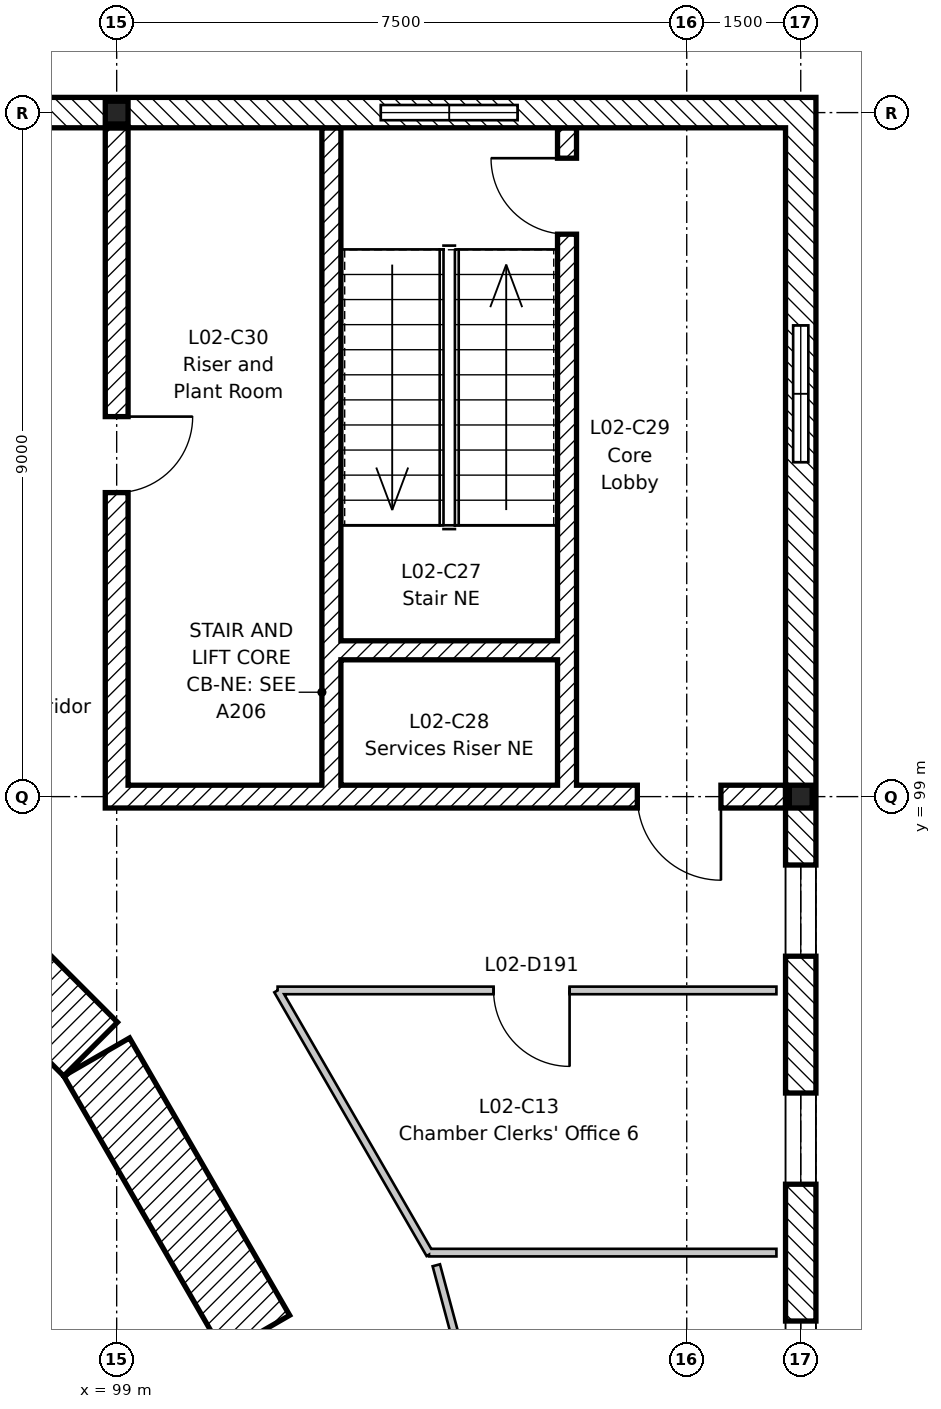
"""IFC4 building model, lengths in metres.
Left out: names, types, materials, properties, quantities, classifications, styles, units other than length and angle.
Written with IfcOpenShell. Run it as: python <this file> out.ifc"""

import sys

from ifc_helpers import new_model, si_unit, direction, frame, frame_2d, origin, origin_2d, place, context, subcontext, project, spatial, rectangle, i_section, extrude, element, fill, save


model = new_model("IFC4")
c1 = context("Model", 3, precision=1e-05, world=origin(), true_north=direction((0.0, 1.0)))
c2 = subcontext(c1, "Body", "Model", "MODEL_VIEW")
j1 = project(units=[si_unit("LENGTHUNIT", "METRE"), si_unit("PLANEANGLEUNIT", "RADIAN")], contexts=[c1])
p1 = place(None, origin())
s1 = spatial("IfcSite", under=j1, at=p1, CompositionType="ELEMENT")
p2 = place(p1, origin())
s2 = spatial("IfcBuilding", under=s1, at=p2, CompositionType="ELEMENT")
p3 = place(p2, frame((0.0, 0.0, 9.9)))
s3 = spatial("IfcBuildingStorey", under=s2, at=p3, CompositionType="ELEMENT", Elevation=9.9)
for number, where, z_axis, x_axis in (
    (1, (99.0, 108.0, -0.2), (0.0, 0.0, 1.0), (1.0, 0.0, 0.0)),
    (2, (108.0, 99.0, -0.2), (0.0, 0.0, 1.0), (1.0, 0.0, 0.0)),
):
    element("IfcColumn", number, at=place(p3, frame(where, z_axis=z_axis, x_axis=x_axis)), inside=s3, PredefinedType="COLUMN", context=c2, shape_type="SweptSolid", body=[
        extrude(i_section(OverallWidth=0.3, OverallDepth=0.3, WebThickness=0.011, FlangeThickness=0.019, FilletRadius=0.027, at=origin_2d()), origin(), (0.0, 0.0, 1.0), 4.45),
    ])
for number, where, z_axis, x_axis in (
    (3, (100.843, 91.926, 0.0), (0.0, 0.0, 1.0), (-0.5, 0.866, 0.0)),
    (4, (98.657, 95.678, 0.0), (0.0, 0.0, 1.0), (-0.707, 0.707, 0.0)),
):
    element("IfcWall", number, at=place(p3, frame(where, z_axis=z_axis, x_axis=x_axis)), inside=s3, PredefinedType="SHEAR", context=c2, shape_type="SweptSolid", body=[
        extrude(rectangle(XDim=4.213, YDim=1.0, at=frame_2d((2.106, 0.0))), origin(), (0.0, 0.0, 1.0), 4.3),
    ])
p4 = place(p3, frame((107.8, 99.0, 0.0), z_axis=(0.0, 0.0, 1.0), x_axis=(-1.0, 0.0, 0.0)))
e5 = element("IfcWall", 5, at=p4, inside=s3, PredefinedType="SHEAR", context=c2, shape_type="SweptSolid", body=[
    extrude(rectangle(XDim=8.95, YDim=0.3, at=frame_2d((4.475, 0.0))), origin(), (0.0, 0.0, 1.0), 4.3),
])
p5 = place(p4, frame((0.85, 0.0, 0.0)))
e6 = element("IfcOpeningElement", 6, at=p5, cuts=e5, PredefinedType="OPENING", context=c2, shape_type="SweptSolid", body=[
    extrude(rectangle(XDim=1.1, YDim=2.1, at=frame_2d((0.55, 1.05))), frame((0.0, 0.16, 0.0), z_axis=(0.0, -1.0, 0.0), x_axis=(1.0, 0.0, 0.0)), (0.0, 0.0, 1.0), 0.32),
])
p6 = place(p3, frame((99.0, 107.8, 0.0), z_axis=(0.0, 0.0, 1.0), x_axis=(0.0, -1.0, 0.0)))
e7 = element("IfcWall", 7, at=p6, inside=s3, PredefinedType="SHEAR", context=c2, shape_type="SweptSolid", body=[
    extrude(rectangle(XDim=8.65, YDim=0.3, at=frame_2d((4.325, 0.0))), origin(), (0.0, 0.0, 1.0), 4.3),
])
p7 = place(p6, frame((3.8, 0.0, 0.0)))
e8 = element("IfcOpeningElement", 8, at=p7, cuts=e7, PredefinedType="OPENING", context=c2, shape_type="SweptSolid", body=[
    extrude(rectangle(XDim=1.0, YDim=2.1, at=frame_2d((0.5, 1.05))), frame((0.0, 0.16, 0.0), z_axis=(0.0, -1.0, 0.0), x_axis=(1.0, 0.0, 0.0)), (0.0, 0.0, 1.0), 0.32),
])
p8 = place(p3, frame((104.925, 107.8, 0.0), z_axis=(0.0, 0.0, 1.0), x_axis=(0.0, -1.0, 0.0)))
e9 = element("IfcWall", 9, at=p8, inside=s3, PredefinedType="SHEAR", context=c2, shape_type="SweptSolid", body=[
    extrude(rectangle(XDim=8.65, YDim=0.25, at=frame_2d((4.325, 0.0))), origin(), (0.0, 0.0, 1.0), 4.3),
])
p9 = place(p8, frame((0.4, 0.0, 0.0)))
e10 = element("IfcOpeningElement", 10, at=p9, cuts=e9, PredefinedType="OPENING", context=c2, shape_type="SweptSolid", body=[
    extrude(rectangle(XDim=1.0, YDim=2.1, at=frame_2d((0.5, 1.05))), frame((0.0, 0.135, 0.0), z_axis=(0.0, -1.0, 0.0), x_axis=(1.0, 0.0, 0.0)), (0.0, 0.0, 1.0), 0.27),
])
p10 = place(p3, frame((101.825, 107.8, 0.0), z_axis=(0.0, 0.0, 1.0), x_axis=(0.0, -1.0, 0.0)))
e11 = element("IfcWall", 11, at=p10, inside=s3, PredefinedType="SHEAR", context=c2, shape_type="SweptSolid", body=[
    extrude(rectangle(XDim=8.65, YDim=0.25, at=frame_2d((4.325, 0.0))), origin(), (0.0, 0.0, 1.0), 4.3),
])
p11 = place(p3, frame((104.8, 100.925, 0.0), z_axis=(0.0, 0.0, 1.0), x_axis=(-1.0, 0.0, 0.0)))
e12 = element("IfcWall", 12, at=p11, inside=s3, PredefinedType="SHEAR", context=c2, shape_type="SweptSolid", body=[
    extrude(rectangle(XDim=2.85, YDim=0.25, at=frame_2d((1.425, 0.0))), origin(), (0.0, 0.0, 1.0), 4.3),
])
p12 = place(p3, frame((72.0, 108.0, 0.0), z_axis=(0.0, 0.0, 1.0), x_axis=(1.0, 0.0, 0.0)))
e13 = element("IfcWall", 13, at=p12, inside=s3, PredefinedType="STANDARD", context=c2, shape_type="SweptSolid", body=[
    extrude(rectangle(XDim=27.0, YDim=0.4, at=frame_2d((13.5, 0.0))), origin(), (0.0, 0.0, 1.0), 3.76),
])
p13 = place(p12, frame((0.9, 0.0, 0.9)))
e14 = element("IfcOpeningElement", 14, at=p13, cuts=e13, PredefinedType="OPENING", context=c2, shape_type="SweptSolid", body=[
    extrude(rectangle(XDim=1.2, YDim=2.4, at=frame_2d((0.6, 1.2))), frame((0.0, 0.21, 0.0), z_axis=(0.0, -1.0, 0.0), x_axis=(1.0, 0.0, 0.0)), (0.0, 0.0, 1.0), 0.42),
])
p14 = place(p12, frame((3.9, 0.0, 0.9)))
e15 = element("IfcOpeningElement", 15, at=p14, cuts=e13, PredefinedType="OPENING", context=c2, shape_type="SweptSolid", body=[
    extrude(rectangle(XDim=1.2, YDim=2.4, at=frame_2d((0.6, 1.2))), frame((0.0, 0.21, 0.0), z_axis=(0.0, -1.0, 0.0), x_axis=(1.0, 0.0, 0.0)), (0.0, 0.0, 1.0), 0.42),
])
p15 = place(p12, frame((6.9, 0.0, 0.9)))
e16 = element("IfcOpeningElement", 16, at=p15, cuts=e13, PredefinedType="OPENING", context=c2, shape_type="SweptSolid", body=[
    extrude(rectangle(XDim=1.2, YDim=2.4, at=frame_2d((0.6, 1.2))), frame((0.0, 0.21, 0.0), z_axis=(0.0, -1.0, 0.0), x_axis=(1.0, 0.0, 0.0)), (0.0, 0.0, 1.0), 0.42),
])
p16 = place(p12, frame((9.9, 0.0, 0.9)))
e17 = element("IfcOpeningElement", 17, at=p16, cuts=e13, PredefinedType="OPENING", context=c2, shape_type="SweptSolid", body=[
    extrude(rectangle(XDim=1.2, YDim=2.4, at=frame_2d((0.6, 1.2))), frame((0.0, 0.21, 0.0), z_axis=(0.0, -1.0, 0.0), x_axis=(1.0, 0.0, 0.0)), (0.0, 0.0, 1.0), 0.42),
])
p17 = place(p12, frame((12.9, 0.0, 0.9)))
e18 = element("IfcOpeningElement", 18, at=p17, cuts=e13, PredefinedType="OPENING", context=c2, shape_type="SweptSolid", body=[
    extrude(rectangle(XDim=1.2, YDim=2.4, at=frame_2d((0.6, 1.2))), frame((0.0, 0.21, 0.0), z_axis=(0.0, -1.0, 0.0), x_axis=(1.0, 0.0, 0.0)), (0.0, 0.0, 1.0), 0.42),
])
p18 = place(p12, frame((15.9, 0.0, 0.9)))
e19 = element("IfcOpeningElement", 19, at=p18, cuts=e13, PredefinedType="OPENING", context=c2, shape_type="SweptSolid", body=[
    extrude(rectangle(XDim=1.2, YDim=2.4, at=frame_2d((0.6, 1.2))), frame((0.0, 0.21, 0.0), z_axis=(0.0, -1.0, 0.0), x_axis=(1.0, 0.0, 0.0)), (0.0, 0.0, 1.0), 0.42),
])
p19 = place(p12, frame((18.9, 0.0, 0.9)))
e20 = element("IfcOpeningElement", 20, at=p19, cuts=e13, PredefinedType="OPENING", context=c2, shape_type="SweptSolid", body=[
    extrude(rectangle(XDim=1.2, YDim=2.4, at=frame_2d((0.6, 1.2))), frame((0.0, 0.21, 0.0), z_axis=(0.0, -1.0, 0.0), x_axis=(1.0, 0.0, 0.0)), (0.0, 0.0, 1.0), 0.42),
])
p20 = place(p12, frame((21.9, 0.0, 0.9)))
e21 = element("IfcOpeningElement", 21, at=p20, cuts=e13, PredefinedType="OPENING", context=c2, shape_type="SweptSolid", body=[
    extrude(rectangle(XDim=1.2, YDim=2.4, at=frame_2d((0.6, 1.2))), frame((0.0, 0.21, 0.0), z_axis=(0.0, -1.0, 0.0), x_axis=(1.0, 0.0, 0.0)), (0.0, 0.0, 1.0), 0.42),
])
p21 = place(p12, frame((24.9, 0.0, 0.9)))
e22 = element("IfcOpeningElement", 22, at=p21, cuts=e13, PredefinedType="OPENING", context=c2, shape_type="SweptSolid", body=[
    extrude(rectangle(XDim=1.2, YDim=2.4, at=frame_2d((0.6, 1.2))), frame((0.0, 0.21, 0.0), z_axis=(0.0, -1.0, 0.0), x_axis=(1.0, 0.0, 0.0)), (0.0, 0.0, 1.0), 0.42),
])
p22 = place(p3, frame((99.0, 108.0, 0.0), z_axis=(0.0, 0.0, 1.0), x_axis=(1.0, 0.0, 0.0)))
e23 = element("IfcWall", 23, at=p22, inside=s3, PredefinedType="STANDARD", context=c2, shape_type="SweptSolid", body=[
    extrude(rectangle(XDim=3.475, YDim=0.4, at=frame_2d((1.738, 0.0))), origin(), (0.0, 0.0, 1.0), 4.3),
])
p23 = place(p3, frame((104.275, 108.0, 0.0), z_axis=(0.0, 0.0, 1.0), x_axis=(1.0, 0.0, 0.0)))
e24 = element("IfcWall", 24, at=p23, inside=s3, PredefinedType="STANDARD", context=c2, shape_type="SweptSolid", body=[
    extrude(rectangle(XDim=3.925, YDim=0.4, at=frame_2d((1.962, 0.0))), origin(), (0.0, 0.0, 1.0), 4.3),
])
p24 = place(p3, frame((102.475, 108.0, 0.0), z_axis=(0.0, 0.0, 1.0), x_axis=(1.0, 0.0, 0.0)))
e25 = element("IfcWall", 25, at=p24, inside=s3, PredefinedType="STANDARD", context=c2, shape_type="SweptSolid", body=[
    extrude(rectangle(XDim=1.8, YDim=0.4, at=frame_2d((0.9, 0.0))), origin(), (0.0, 0.0, 1.0), 0.9),
])
p25 = place(p3, frame((108.0, 72.0, 0.0), z_axis=(0.0, 0.0, 1.0), x_axis=(0.0, 1.0, 0.0)))
e26 = element("IfcWall", 26, at=p25, inside=s3, PredefinedType="STANDARD", context=c2, shape_type="SweptSolid", body=[
    extrude(rectangle(XDim=27.0, YDim=0.4, at=frame_2d((13.5, 0.0))), origin(), (0.0, 0.0, 1.0), 3.76),
])
p26 = place(p25, frame((0.9, 0.0, 0.9)))
e27 = element("IfcOpeningElement", 27, at=p26, cuts=e26, PredefinedType="OPENING", context=c2, shape_type="SweptSolid", body=[
    extrude(rectangle(XDim=1.2, YDim=2.4, at=frame_2d((0.6, 1.2))), frame((0.0, 0.21, 0.0), z_axis=(0.0, -1.0, 0.0), x_axis=(1.0, 0.0, 0.0)), (0.0, 0.0, 1.0), 0.42),
])
p27 = place(p25, frame((3.9, 0.0, 0.9)))
e28 = element("IfcOpeningElement", 28, at=p27, cuts=e26, PredefinedType="OPENING", context=c2, shape_type="SweptSolid", body=[
    extrude(rectangle(XDim=1.2, YDim=2.4, at=frame_2d((0.6, 1.2))), frame((0.0, 0.21, 0.0), z_axis=(0.0, -1.0, 0.0), x_axis=(1.0, 0.0, 0.0)), (0.0, 0.0, 1.0), 0.42),
])
p28 = place(p25, frame((6.9, 0.0, 0.9)))
e29 = element("IfcOpeningElement", 29, at=p28, cuts=e26, PredefinedType="OPENING", context=c2, shape_type="SweptSolid", body=[
    extrude(rectangle(XDim=1.2, YDim=2.4, at=frame_2d((0.6, 1.2))), frame((0.0, 0.21, 0.0), z_axis=(0.0, -1.0, 0.0), x_axis=(1.0, 0.0, 0.0)), (0.0, 0.0, 1.0), 0.42),
])
p29 = place(p25, frame((9.9, 0.0, 0.9)))
e30 = element("IfcOpeningElement", 30, at=p29, cuts=e26, PredefinedType="OPENING", context=c2, shape_type="SweptSolid", body=[
    extrude(rectangle(XDim=1.2, YDim=2.4, at=frame_2d((0.6, 1.2))), frame((0.0, 0.21, 0.0), z_axis=(0.0, -1.0, 0.0), x_axis=(1.0, 0.0, 0.0)), (0.0, 0.0, 1.0), 0.42),
])
p30 = place(p25, frame((12.9, 0.0, 0.9)))
e31 = element("IfcOpeningElement", 31, at=p30, cuts=e26, PredefinedType="OPENING", context=c2, shape_type="SweptSolid", body=[
    extrude(rectangle(XDim=1.2, YDim=2.4, at=frame_2d((0.6, 1.2))), frame((0.0, 0.21, 0.0), z_axis=(0.0, -1.0, 0.0), x_axis=(1.0, 0.0, 0.0)), (0.0, 0.0, 1.0), 0.42),
])
p31 = place(p25, frame((15.9, 0.0, 0.9)))
e32 = element("IfcOpeningElement", 32, at=p31, cuts=e26, PredefinedType="OPENING", context=c2, shape_type="SweptSolid", body=[
    extrude(rectangle(XDim=1.2, YDim=2.4, at=frame_2d((0.6, 1.2))), frame((0.0, 0.21, 0.0), z_axis=(0.0, -1.0, 0.0), x_axis=(1.0, 0.0, 0.0)), (0.0, 0.0, 1.0), 0.42),
])
p32 = place(p25, frame((18.9, 0.0, 0.9)))
e33 = element("IfcOpeningElement", 33, at=p32, cuts=e26, PredefinedType="OPENING", context=c2, shape_type="SweptSolid", body=[
    extrude(rectangle(XDim=1.2, YDim=2.4, at=frame_2d((0.6, 1.2))), frame((0.0, 0.21, 0.0), z_axis=(0.0, -1.0, 0.0), x_axis=(1.0, 0.0, 0.0)), (0.0, 0.0, 1.0), 0.42),
])
p33 = place(p25, frame((21.9, 0.0, 0.9)))
e34 = element("IfcOpeningElement", 34, at=p33, cuts=e26, PredefinedType="OPENING", context=c2, shape_type="SweptSolid", body=[
    extrude(rectangle(XDim=1.2, YDim=2.4, at=frame_2d((0.6, 1.2))), frame((0.0, 0.21, 0.0), z_axis=(0.0, -1.0, 0.0), x_axis=(1.0, 0.0, 0.0)), (0.0, 0.0, 1.0), 0.42),
])
p34 = place(p25, frame((24.9, 0.0, 0.9)))
e35 = element("IfcOpeningElement", 35, at=p34, cuts=e26, PredefinedType="OPENING", context=c2, shape_type="SweptSolid", body=[
    extrude(rectangle(XDim=1.2, YDim=2.4, at=frame_2d((0.6, 1.2))), frame((0.0, 0.21, 0.0), z_axis=(0.0, -1.0, 0.0), x_axis=(1.0, 0.0, 0.0)), (0.0, 0.0, 1.0), 0.42),
])
p35 = place(p3, frame((108.0, 99.0, 0.0), z_axis=(0.0, 0.0, 1.0), x_axis=(0.0, 1.0, 0.0)))
e36 = element("IfcWall", 36, at=p35, inside=s3, PredefinedType="STANDARD", context=c2, shape_type="SweptSolid", body=[
    extrude(rectangle(XDim=4.4, YDim=0.4, at=frame_2d((2.2, 0.0))), origin(), (0.0, 0.0, 1.0), 4.3),
])
p36 = place(p3, frame((108.0, 105.2, 0.0), z_axis=(0.0, 0.0, 1.0), x_axis=(0.0, 1.0, 0.0)))
e37 = element("IfcWall", 37, at=p36, inside=s3, PredefinedType="STANDARD", context=c2, shape_type="SweptSolid", body=[
    extrude(rectangle(XDim=2.6, YDim=0.4, at=frame_2d((1.3, 0.0))), origin(), (0.0, 0.0, 1.0), 4.3),
])
p37 = place(p3, frame((108.0, 103.4, 0.0), z_axis=(0.0, 0.0, 1.0), x_axis=(0.0, 1.0, 0.0)))
e38 = element("IfcWall", 38, at=p37, inside=s3, PredefinedType="STANDARD", context=c2, shape_type="SweptSolid", body=[
    extrude(rectangle(XDim=1.8, YDim=0.4, at=frame_2d((0.9, 0.0))), origin(), (0.0, 0.0, 1.0), 0.9),
])
p38 = place(p3, frame((107.68, 93.0, 0.0), z_axis=(0.0, 0.0, 1.0), x_axis=(-1.0, 0.0, 0.0)))
e39 = element("IfcWall", 39, at=p38, inside=s3, PredefinedType="PARTITIONING", context=c2, shape_type="SweptSolid", body=[
    extrude(rectangle(XDim=4.571, YDim=0.1, at=frame_2d((2.285, 0.0))), origin(), (0.0, 0.0, 1.0), 3.76),
])
p39 = place(p3, frame((103.205, 92.834, 0.0), z_axis=(0.0, 0.0, 1.0), x_axis=(0.258840974822, -0.965919949972, 0.0)))
e40 = element("IfcWall", 40, at=p39, inside=s3, PredefinedType="PARTITIONING", context=c2, shape_type="SweptSolid", body=[
    extrude(rectangle(XDim=5.003, YDim=0.1, at=frame_2d((2.501, 0.0))), origin(), (0.0, 0.0, 1.0), 3.76),
])
p40 = place(p3, frame((107.68, 96.45, 0.0), z_axis=(0.0, 0.0, 1.0), x_axis=(-1.0, 0.0, 0.0)))
e41 = element("IfcWall", 41, at=p40, inside=s3, PredefinedType="PARTITIONING", context=c2, shape_type="SweptSolid", body=[
    extrude(rectangle(XDim=6.563, YDim=0.1, at=frame_2d((3.281, 0.0))), origin(), (0.0, 0.0, 1.0), 3.76),
])
p41 = place(p40, frame((2.721, 0.0, 0.0)))
e42 = element("IfcOpeningElement", 42, at=p41, cuts=e41, PredefinedType="OPENING", context=c2, shape_type="SweptSolid", body=[
    extrude(rectangle(XDim=1.0, YDim=2.1, at=frame_2d((0.5, 1.05))), frame((0.0, 0.06, 0.0), z_axis=(0.0, -1.0, 0.0), x_axis=(1.0, 0.0, 0.0)), (0.0, 0.0, 1.0), 0.12),
])
p42 = place(p3, frame((101.117, 96.45, 0.0), z_axis=(0.0, 0.0, 1.0), x_axis=(0.500005512359, -0.866022221199, 0.0)))
e43 = element("IfcWall", 43, at=p42, inside=s3, PredefinedType="PARTITIONING", context=c2, shape_type="SweptSolid", body=[
    extrude(rectangle(XDim=4.007, YDim=0.1, at=frame_2d((2.003, 0.0))), origin(), (0.0, 0.0, 1.0), 3.76),
])
p43 = place(p32, origin())
e44 = element("IfcWindow", 44, at=p43, inside=s3, PartitioningType="SINGLE_PANEL", PredefinedType="WINDOW", context=c2, shape_type="SweptSolid", body=[
    extrude(rectangle(XDim=1.2, YDim=2.4, at=frame_2d((0.6, 1.2))), frame((0.0, 0.03, 0.0), z_axis=(0.0, -1.0, 0.0), x_axis=(1.0, 0.0, 0.0)), (0.0, 0.0, 1.0), 0.06),
])
fill(e33, e44)
p44 = place(p33, origin())
e45 = element("IfcWindow", 45, at=p44, inside=s3, PartitioningType="SINGLE_PANEL", PredefinedType="WINDOW", context=c2, shape_type="SweptSolid", body=[
    extrude(rectangle(XDim=1.2, YDim=2.4, at=frame_2d((0.6, 1.2))), frame((0.0, 0.03, 0.0), z_axis=(0.0, -1.0, 0.0), x_axis=(1.0, 0.0, 0.0)), (0.0, 0.0, 1.0), 0.06),
])
fill(e34, e45)
p45 = place(p34, origin())
e46 = element("IfcWindow", 46, at=p45, inside=s3, PartitioningType="SINGLE_PANEL", PredefinedType="WINDOW", context=c2, shape_type="SweptSolid", body=[
    extrude(rectangle(XDim=1.2, YDim=2.4, at=frame_2d((0.6, 1.2))), frame((0.0, 0.03, 0.0), z_axis=(0.0, -1.0, 0.0), x_axis=(1.0, 0.0, 0.0)), (0.0, 0.0, 1.0), 0.06),
])
fill(e35, e46)
p46 = place(p9, frame((1.0, 0.0, 0.0), z_axis=(0.0, 0.0, 1.0), x_axis=(-1.0, 0.0, 0.0)))
e47 = element("IfcDoor", 47, at=p46, inside=s3, OperationType="SINGLE_SWING_RIGHT", PredefinedType="DOOR", context=c2, shape_type="SweptSolid", body=[
    extrude(rectangle(XDim=1.0, YDim=2.1, at=frame_2d((0.5, 1.05))), frame((0.0, 0.025, 0.0), z_axis=(0.0, -1.0, 0.0), x_axis=(1.0, 0.0, 0.0)), (0.0, 0.0, 1.0), 0.05),
])
fill(e10, e47)
p47 = place(p5, origin())
e48 = element("IfcDoor", 48, at=p47, inside=s3, OperationType="SINGLE_SWING_LEFT", PredefinedType="DOOR", context=c2, shape_type="SweptSolid", body=[
    extrude(rectangle(XDim=1.1, YDim=2.1, at=frame_2d((0.55, 1.05))), frame((0.0, 0.025, 0.0), z_axis=(0.0, -1.0, 0.0), x_axis=(1.0, 0.0, 0.0)), (0.0, 0.0, 1.0), 0.05),
])
fill(e6, e48)
p48 = place(p7, origin())
e49 = element("IfcDoor", 49, at=p48, inside=s3, OperationType="SINGLE_SWING_LEFT", PredefinedType="DOOR", context=c2, shape_type="SweptSolid", body=[
    extrude(rectangle(XDim=1.0, YDim=2.1, at=frame_2d((0.5, 1.05))), frame((0.0, 0.025, 0.0), z_axis=(0.0, -1.0, 0.0), x_axis=(1.0, 0.0, 0.0)), (0.0, 0.0, 1.0), 0.05),
])
fill(e8, e49)
p49 = place(p41, origin())
e50 = element("IfcDoor", 50, at=p49, inside=s3, OperationType="SINGLE_SWING_LEFT", PredefinedType="DOOR", context=c2, shape_type="SweptSolid", body=[
    extrude(rectangle(XDim=1.0, YDim=2.1, at=frame_2d((0.5, 1.05))), frame((0.0, 0.025, 0.0), z_axis=(0.0, -1.0, 0.0), x_axis=(1.0, 0.0, 0.0)), (0.0, 0.0, 1.0), 0.05),
])
fill(e42, e50)
save(model, sys.argv[1])
